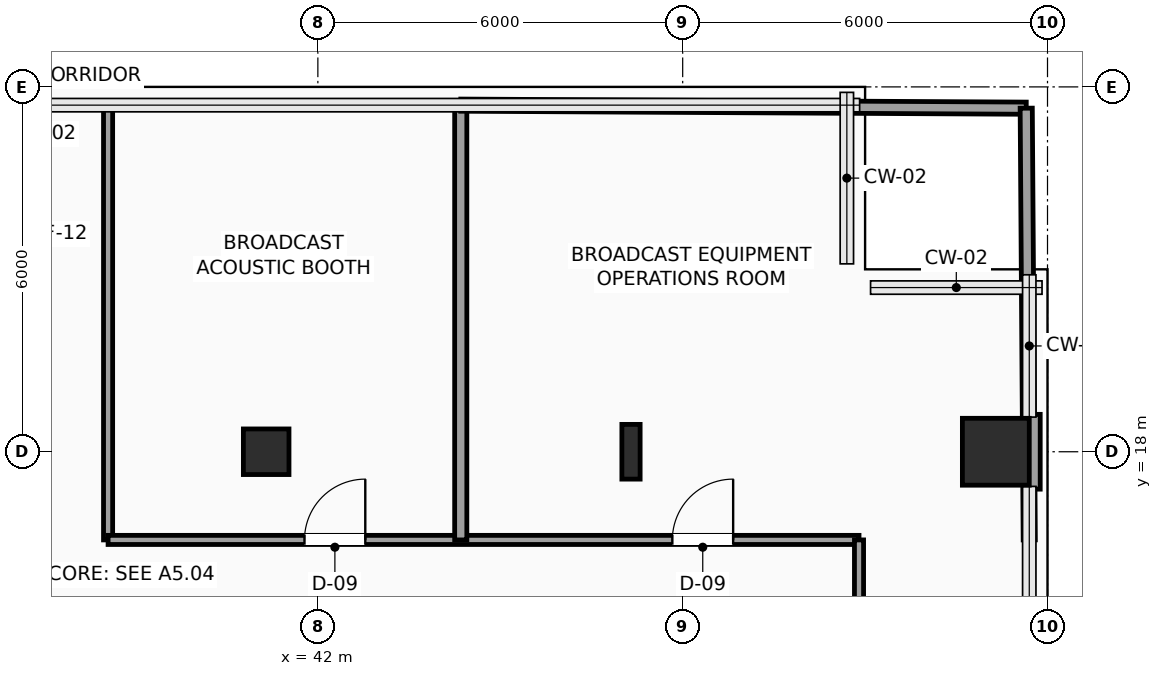
"""IFC4 building model, lengths in metres.
Left out: names, types, materials, properties, quantities, classifications, styles, units other than length and angle.
Written with IfcOpenShell. Run it as: python <this file> out.ifc"""

import sys

from ifc_helpers import new_model, si_unit, direction, frame, frame_2d, origin, origin_2d, place, context, subcontext, project, spatial, rectangle, hollow_rectangle, i_section, extrude, element, fill, save


model = new_model("IFC4")
c1 = context("Model", 3, precision=1e-05, world=origin(), true_north=direction((0.0, 1.0)))
c2 = subcontext(c1, "Body", "Model", "MODEL_VIEW")
j1 = project(units=[si_unit("LENGTHUNIT", "METRE"), si_unit("PLANEANGLEUNIT", "RADIAN")], contexts=[c1])
p1 = place(None, origin())
s1 = spatial("IfcSite", under=j1, at=p1, CompositionType="ELEMENT")
p2 = place(p1, origin())
s2 = spatial("IfcBuilding", under=s1, at=p2, CompositionType="ELEMENT")
p3 = place(p2, frame((0.0, 0.0, 75.3)))
s3 = spatial("IfcBuildingStorey", under=s2, at=p3, CompositionType="ELEMENT", Elevation=75.3)
p4 = place(p3, frame((41.15, 18.0, 0.0), z_axis=(0.0, 0.0, 1.0), x_axis=(1.0, 0.0, 0.0)))
e1 = element("IfcColumn", 1, at=p4, inside=s3, PredefinedType="COLUMN", context=c2, shape_type="SweptSolid", body=[
    extrude(hollow_rectangle(XDim=0.75, YDim=0.75, WallThickness=0.035, InnerFilletRadius=0.035, OuterFilletRadius=0.05, at=origin_2d()), origin(), (0.0, 0.0, 1.0), 3.9),
])
p5 = place(p3, frame((47.15, 18.0, 0.0), z_axis=(0.0, 0.0, 1.0), x_axis=(1.0, 0.0, 0.0)))
e2 = element("IfcColumn", 2, at=p5, inside=s3, PredefinedType="COLUMN", context=c2, shape_type="SweptSolid", body=[
    extrude(i_section(OverallWidth=0.3, OverallDepth=0.9, WebThickness=0.019, FlangeThickness=0.035, FilletRadius=0.03, at=origin_2d()), origin(), (0.0, 0.0, 1.0), 3.9),
])
p6 = place(p3, frame((53.15, 18.0, 0.0), z_axis=(0.0, 0.0, 1.0), x_axis=(1.0, 0.0, 0.0)))
e3 = element("IfcColumn", 3, at=p6, inside=s3, PredefinedType="COLUMN", context=c2, shape_type="SweptSolid", body=[
    extrude(rectangle(XDim=1.1, YDim=1.1, at=origin_2d()), origin(), (0.0, 0.0, 1.0), 3.9),
])
p7 = place(p3, frame((53.76, 18.615, 0.0), z_axis=(0.0, 0.0, 1.0), x_axis=(0.0, -1.0, 0.0)))
e4 = element("IfcWall", 4, at=p7, inside=s3, PredefinedType="SOLIDWALL", context=c2, shape_type="SweptSolid", body=[
    extrude(rectangle(XDim=1.23, YDim=0.24, at=frame_2d((0.615, 0.0))), origin(), (0.0, 0.0, 1.0), 3.65),
])
p8 = place(p3, frame((38.55, 23.7, 0.0), z_axis=(0.0, 0.0, 1.0), x_axis=(0.0, -1.0, 0.0)))
e5 = element("IfcWall", 5, at=p8, inside=s3, PredefinedType="PARTITIONING", context=c2, shape_type="SweptSolid", body=[
    extrude(rectangle(XDim=7.15, YDim=0.15, at=frame_2d((3.575, 0.0))), origin(), (0.0, 0.0, 1.0), 3.65),
])
p9 = place(p3, frame((38.55, 16.55, 0.0), z_axis=(0.0, 0.0, 1.0), x_axis=(1.0, 0.0, 0.0)))
e6 = element("IfcWall", 6, at=p9, inside=s3, PredefinedType="PARTITIONING", context=c2, shape_type="SweptSolid", body=[
    extrude(rectangle(XDim=12.35, YDim=0.15, at=frame_2d((6.175, 0.0))), origin(), (0.0, 0.0, 1.0), 3.65),
])
p10 = place(p9, frame((3.23, 0.0, 0.0)))
e7 = element("IfcOpeningElement", 7, at=p10, cuts=e6, PredefinedType="OPENING", context=c2, shape_type="SweptSolid", body=[
    extrude(rectangle(XDim=1.0, YDim=2.2, at=frame_2d((0.5, 1.1))), frame((0.0, 0.085, 0.0), z_axis=(0.0, -1.0, 0.0), x_axis=(1.0, 0.0, 0.0)), (0.0, 0.0, 1.0), 0.17),
])
p11 = place(p9, frame((9.28, 0.0, 0.0)))
e8 = element("IfcOpeningElement", 8, at=p11, cuts=e6, PredefinedType="OPENING", context=c2, shape_type="SweptSolid", body=[
    extrude(rectangle(XDim=1.0, YDim=2.2, at=frame_2d((0.5, 1.1))), frame((0.0, 0.085, 0.0), z_axis=(0.0, -1.0, 0.0), x_axis=(1.0, 0.0, 0.0)), (0.0, 0.0, 1.0), 0.17),
])
p12 = place(p3, frame((50.9, 16.55, 0.0), z_axis=(0.0, 0.0, 1.0), x_axis=(0.0, -1.0, 0.0)))
e9 = element("IfcWall", 9, at=p12, inside=s3, PredefinedType="PARTITIONING", context=c2, shape_type="SweptSolid", body=[
    extrude(rectangle(XDim=2.35, YDim=0.15, at=frame_2d((1.175, 0.0))), origin(), (0.0, 0.0, 1.0), 3.65),
])
p13 = place(p3, frame((44.35, 16.55, 0.0), z_axis=(0.0, 0.0, 1.0), x_axis=(0.0, 1.0, 0.0)))
e10 = element("IfcWall", 10, at=p13, inside=s3, PredefinedType="PARTITIONING", context=c2, shape_type="SweptSolid", body=[
    extrude(rectangle(XDim=7.15, YDim=0.2, at=frame_2d((3.575, 0.0))), origin(), (0.0, 0.0, 1.0), 3.65),
])
p14 = place(p3, frame((44.35, 23.7, 0.0), z_axis=(0.0, 0.0, 1.0), x_axis=(0.999985518927, -0.005381629512, 0.0)))
e11 = element("IfcWall", 11, at=p14, inside=s3, PredefinedType="PARTITIONING", context=c2, shape_type="SweptSolid", body=[
    extrude(rectangle(XDim=9.3, YDim=0.2, at=frame_2d((4.65, 0.0))), origin(), (0.0, 0.0, 1.0), 3.65),
])
p15 = place(p3, frame((53.7, 16.55, 0.0), z_axis=(0.0, 0.0, 1.0), x_axis=(-0.007017371073, 0.999975377948, 0.0)))
e12 = element("IfcWall", 12, at=p15, inside=s3, PredefinedType="PARTITIONING", context=c2, shape_type="SweptSolid", body=[
    extrude(rectangle(XDim=0.835, YDim=0.2, at=frame_2d((0.417, 0.0))), origin(), (0.0, 0.0, 1.0), 3.65),
])
p16 = place(p3, frame((53.686, 18.615, 0.0), z_axis=(0.0, 0.0, 1.0), x_axis=(-0.007079296972, 0.999974941463, 0.0)))
e13 = element("IfcWall", 13, at=p16, inside=s3, PredefinedType="PARTITIONING", context=c2, shape_type="SweptSolid", body=[
    extrude(rectangle(XDim=5.035, YDim=0.2, at=frame_2d((2.518, 0.0))), origin(), (0.0, 0.0, 1.0), 3.65),
])
p17 = place(p10, origin())
e14 = element("IfcDoor", 14, at=p17, inside=s3, OperationType="SINGLE_SWING_RIGHT", PredefinedType="DOOR", context=c2, shape_type="SweptSolid", body=[
    extrude(rectangle(XDim=1.0, YDim=2.2, at=frame_2d((0.5, 1.1))), frame((0.0, 0.025, 0.0), z_axis=(0.0, -1.0, 0.0), x_axis=(1.0, 0.0, 0.0)), (0.0, 0.0, 1.0), 0.05),
])
fill(e7, e14)
p18 = place(p11, origin())
e15 = element("IfcDoor", 15, at=p18, inside=s3, OperationType="SINGLE_SWING_RIGHT", PredefinedType="DOOR", context=c2, shape_type="SweptSolid", body=[
    extrude(rectangle(XDim=1.0, YDim=2.2, at=frame_2d((0.5, 1.1))), frame((0.0, 0.025, 0.0), z_axis=(0.0, -1.0, 0.0), x_axis=(1.0, 0.0, 0.0)), (0.0, 0.0, 1.0), 0.05),
])
fill(e8, e15)
save(model, sys.argv[1])
